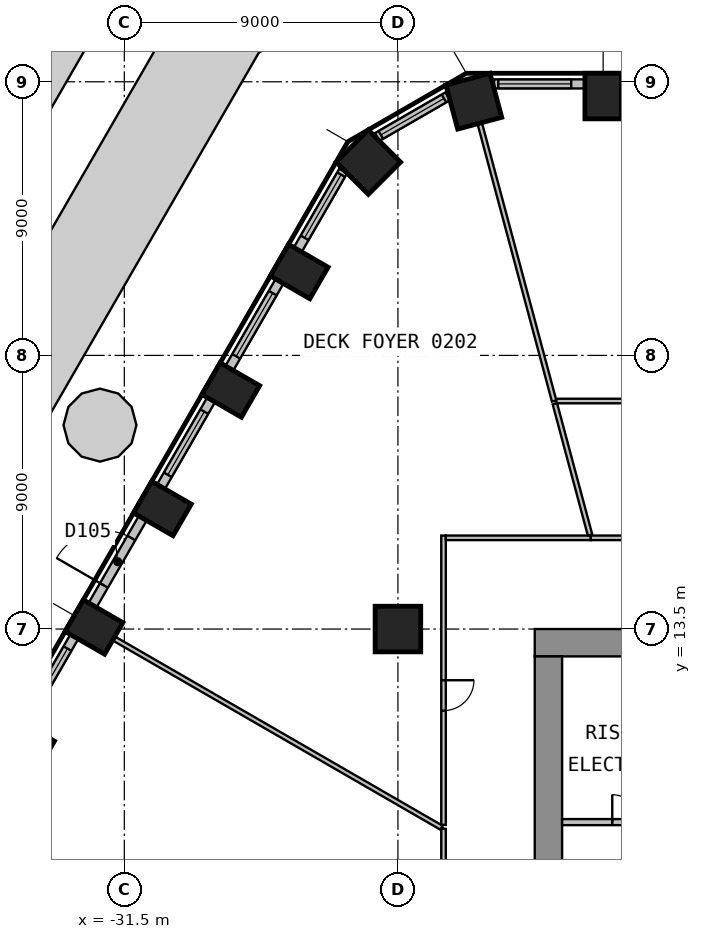
"""IFC4 building model, lengths in metres.
Left out: names, types, materials, properties, quantities, classifications, styles, units other than length and angle.
Written with IfcOpenShell. Run it as: python <this file> out.ifc"""

import sys

from ifc_helpers import new_model, si_unit, direction, frame, frame_2d, origin, origin_2d, place, context, subcontext, project, spatial, polyline, rectangle, circle, outline, extrude, element, fill, save


model = new_model("IFC4")
c1 = context("Model", 3, precision=1e-05, world=origin(), true_north=direction((0.0, 1.0)))
c2 = subcontext(c1, "Body", "Model", "MODEL_VIEW")
j1 = project(units=[si_unit("LENGTHUNIT", "METRE"), si_unit("PLANEANGLEUNIT", "RADIAN")], contexts=[c1])
p1 = place(None, origin())
s1 = spatial("IfcSite", under=j1, at=p1, CompositionType="ELEMENT")
p2 = place(p1, origin())
s2 = spatial("IfcBuilding", under=s1, at=p2, CompositionType="ELEMENT")
p3 = place(p2, frame((0.0, 0.0, 10.8)))
s3 = spatial("IfcBuildingStorey", under=s2, at=p3, CompositionType="ELEMENT", Elevation=10.8)
p4 = place(p3, frame((-15.75, 31.03, 0.0), z_axis=(0.0, 0.0, 1.0), x_axis=(-1.0, 0.0, 0.0)))
e1 = element("IfcColumn", 1, at=p4, inside=s3, PredefinedType="COLUMN", context=c2, shape_type="SweptSolid", body=[
    extrude(rectangle(XDim=1.2, YDim=1.5, at=origin_2d()), origin(), (0.0, 0.0, 1.0), 4.4),
])
for number, where, z_axis, x_axis in (
    (2, (-20.004, 30.861, 0.0), (0.0, 0.0, 1.0), (-0.966, -0.259, 0.0)),
    (3, (-23.475, 28.857, 0.0), (0.0, 0.0, 1.0), (-0.707, -0.707, 0.0)),
):
    element("IfcColumn", number, at=place(p3, frame(where, z_axis=z_axis, x_axis=x_axis)), inside=s3, PredefinedType="COLUMN", context=c2, shape_type="SweptSolid", body=[
        extrude(rectangle(XDim=1.5, YDim=1.5, at=origin_2d()), origin(), (0.0, 0.0, 1.0), 4.4),
    ])
for number, where, z_axis, x_axis in (
    (4, (-25.748, 25.258, 0.0), (0.0, 0.0, 1.0), (-0.5, -0.866, 0.0)),
    (5, (-27.998, 21.361, 0.0), (0.0, 0.0, 1.0), (-0.5, -0.866, 0.0)),
    (6, (-30.248, 17.463, 0.0), (0.0, 0.0, 1.0), (-0.5, -0.866, 0.0)),
    (7, (-32.498, 13.566, 0.0), (0.0, 0.0, 1.0), (-0.5, -0.866, 0.0)),
    (8, (-34.748, 9.669, 0.0), (0.0, 0.0, 1.0), (-0.5, -0.866, 0.0)),
):
    element("IfcColumn", number, at=place(p3, frame(where, z_axis=z_axis, x_axis=x_axis)), inside=s3, PredefinedType="COLUMN", context=c2, shape_type="SweptSolid", body=[
        extrude(rectangle(XDim=1.2, YDim=1.5, at=origin_2d()), origin(), (0.0, 0.0, 1.0), 4.4),
    ])
p5 = place(p3, frame((-22.5, 13.5, 0.0), z_axis=(0.0, 0.0, 1.0), x_axis=(1.0, 0.0, 0.0)))
e9 = element("IfcColumn", 9, at=p5, inside=s3, PredefinedType="COLUMN", context=c2, shape_type="SweptSolid", body=[
    extrude(circle(Radius=0.75, at=origin_2d()), origin(), (0.0, 0.0, 1.0), 4.4),
])
p6 = place(p3, frame((-16.351, 31.43, 0.0), z_axis=(0.0, 0.0, 1.0), x_axis=(-1.0, 0.0, 0.0)))
e10 = element("IfcWall", 10, at=p6, inside=s3, PredefinedType="SOLIDWALL", context=c2, shape_type="SweptSolid", body=[
    extrude(rectangle(XDim=2.989, YDim=0.3, at=frame_2d((1.494, 0.0))), origin(), (0.0, 0.0, 1.0), 4.4),
])
p7 = place(p6, frame((0.449, 0.0, 0.9)))
e11 = element("IfcOpeningElement", 11, at=p7, cuts=e10, PredefinedType="OPENING", context=c2, shape_type="SweptSolid", body=[
    extrude(rectangle(XDim=2.4, YDim=3.0, at=frame_2d((1.2, 1.5))), frame((0.0, 0.16, 0.0), z_axis=(0.0, -1.0, 0.0), x_axis=(1.0, 0.0, 0.0)), (0.0, 0.0, 1.0), 0.32),
])
p8 = place(p3, frame((-20.864, 31.021, 0.0), z_axis=(0.0, 0.0, 1.0), x_axis=(-0.866001915448, -0.500040680786, 0.0)))
e12 = element("IfcWall", 12, at=p8, inside=s3, PredefinedType="SOLIDWALL", context=c2, shape_type="SweptSolid", body=[
    extrude(rectangle(XDim=2.678, YDim=0.3, at=frame_2d((1.339, 0.0))), origin(), (0.0, 0.0, 1.0), 4.4),
])
p9 = place(p8, frame((0.139, 0.0, 0.9)))
e13 = element("IfcOpeningElement", 13, at=p9, cuts=e12, PredefinedType="OPENING", context=c2, shape_type="SweptSolid", body=[
    extrude(rectangle(XDim=2.4, YDim=3.0, at=frame_2d((1.2, 1.5))), frame((0.0, 0.16, 0.0), z_axis=(0.0, -1.0, 0.0), x_axis=(1.0, 0.0, 0.0)), (0.0, 0.0, 1.0), 0.32),
])
p10 = place(p3, frame((-24.299, 28.566, 0.0), z_axis=(0.0, 0.0, 1.0), x_axis=(-0.49999586137, -0.866027793211, 0.0)))
e14 = element("IfcWall", 14, at=p10, inside=s3, PredefinedType="SOLIDWALL", context=c2, shape_type="SweptSolid", body=[
    extrude(rectangle(XDim=2.989, YDim=0.3, at=frame_2d((1.494, 0.0))), origin(), (0.0, 0.0, 1.0), 4.4),
])
p11 = place(p10, frame((0.139, 0.0, 0.9)))
e15 = element("IfcOpeningElement", 15, at=p11, cuts=e14, PredefinedType="OPENING", context=c2, shape_type="SweptSolid", body=[
    extrude(rectangle(XDim=2.4, YDim=3.0, at=frame_2d((1.2, 1.5))), frame((0.0, 0.16, 0.0), z_axis=(0.0, -1.0, 0.0), x_axis=(1.0, 0.0, 0.0)), (0.0, 0.0, 1.0), 0.32),
])
p12 = place(p3, frame((-26.394, 24.938, 0.0), z_axis=(0.0, 0.0, 1.0), x_axis=(-0.499991515992, -0.866030301974, 0.0)))
e16 = element("IfcWall", 16, at=p12, inside=s3, PredefinedType="SOLIDWALL", context=c2, shape_type="SweptSolid", body=[
    extrude(rectangle(XDim=3.299, YDim=0.3, at=frame_2d((1.649, 0.0))), origin(), (0.0, 0.0, 1.0), 4.4),
])
p13 = place(p12, frame((0.449, 0.0, 0.9)))
e17 = element("IfcOpeningElement", 17, at=p13, cuts=e16, PredefinedType="OPENING", context=c2, shape_type="SweptSolid", body=[
    extrude(rectangle(XDim=2.4, YDim=3.0, at=frame_2d((1.2, 1.5))), frame((0.0, 0.16, 0.0), z_axis=(0.0, -1.0, 0.0), x_axis=(1.0, 0.0, 0.0)), (0.0, 0.0, 1.0), 0.32),
])
p14 = place(p3, frame((-28.644, 21.041, 0.0), z_axis=(0.0, 0.0, 1.0), x_axis=(-0.499991515992, -0.866030301974, 0.0)))
e18 = element("IfcWall", 18, at=p14, inside=s3, PredefinedType="SOLIDWALL", context=c2, shape_type="SweptSolid", body=[
    extrude(rectangle(XDim=3.299, YDim=0.3, at=frame_2d((1.649, 0.0))), origin(), (0.0, 0.0, 1.0), 4.4),
])
p15 = place(p14, frame((0.449, 0.0, 0.9)))
e19 = element("IfcOpeningElement", 19, at=p15, cuts=e18, PredefinedType="OPENING", context=c2, shape_type="SweptSolid", body=[
    extrude(rectangle(XDim=2.4, YDim=3.0, at=frame_2d((1.2, 1.5))), frame((0.0, 0.16, 0.0), z_axis=(0.0, -1.0, 0.0), x_axis=(1.0, 0.0, 0.0)), (0.0, 0.0, 1.0), 0.32),
])
p16 = place(p3, frame((-32.544, 14.286, 0.0), z_axis=(0.0, 0.0, 1.0), x_axis=(0.499991515992, 0.866030301974, 0.0)))
e20 = element("IfcWall", 20, at=p16, inside=s3, PredefinedType="SOLIDWALL", context=c2, shape_type="SweptSolid", body=[
    extrude(rectangle(XDim=3.299, YDim=0.3, at=frame_2d((1.649, 0.0))), origin(), (0.0, 0.0, 1.0), 4.4),
])
p17 = place(p16, frame((0.75, 0.0, 0.0)))
e21 = element("IfcOpeningElement", 21, at=p17, cuts=e20, PredefinedType="OPENING", context=c2, shape_type="SweptSolid", body=[
    extrude(rectangle(XDim=1.8, YDim=2.4, at=frame_2d((0.9, 1.2))), frame((0.0, 0.16, 0.0), z_axis=(0.0, -1.0, 0.0), x_axis=(1.0, 0.0, 0.0)), (0.0, 0.0, 1.0), 0.32),
])
p18 = place(p3, frame((-33.144, 13.246, 0.0), z_axis=(0.0, 0.0, 1.0), x_axis=(-0.499991515992, -0.866030301974, 0.0)))
e22 = element("IfcWall", 22, at=p18, inside=s3, PredefinedType="SOLIDWALL", context=c2, shape_type="SweptSolid", body=[
    extrude(rectangle(XDim=3.299, YDim=0.3, at=frame_2d((1.649, 0.0))), origin(), (0.0, 0.0, 1.0), 4.4),
])
p19 = place(p18, frame((0.449, 0.0, 0.9)))
e23 = element("IfcOpeningElement", 23, at=p19, cuts=e22, PredefinedType="OPENING", context=c2, shape_type="SweptSolid", body=[
    extrude(rectangle(XDim=2.4, YDim=3.0, at=frame_2d((1.2, 1.5))), frame((0.0, 0.16, 0.0), z_axis=(0.0, -1.0, 0.0), x_axis=(1.0, 0.0, 0.0)), (0.0, 0.0, 1.0), 0.32),
])
p20 = place(p3, origin())
e24 = element("IfcWall", 24, at=p20, inside=s3, PredefinedType="SOLIDWALL", context=c2, shape_type="SweptSolid", body=[
    extrude(outline(polyline([(-37.484, 20.429), (-34.886, 18.929), (-27.075, 32.458), (-21.322, 35.78), (-1.2, 35.78), (-1.2, 38.78), (-22.125, 38.78), (-29.271, 34.654), (-37.484, 20.429)])), origin(), (0.0, 0.0, 1.0), 0.9),
])
p21 = place(p3, origin())
e25 = element("IfcWall", 25, at=p21, inside=s3, PredefinedType="SOLIDWALL", context=c2, shape_type="SweptSolid", body=[
    extrude(outline(polyline([(-42.68, 23.429), (-39.216, 21.429), (-30.736, 36.118), (-22.662, 40.78), (-1.2, 40.78), (-1.2, 44.78), (-23.733, 44.78), (-33.664, 39.046), (-42.68, 23.429)])), origin(), (0.0, 0.0, 1.0), 0.9),
])
p22 = place(p3, origin())
e26 = element("IfcWall", 26, at=p22, inside=s3, PredefinedType="SOLIDWALL", context=c2, shape_type="SweptSolid", body=[
    extrude(outline(polyline([(-31.101, 20.208), (-31.261, 19.608), (-31.701, 19.168), (-32.301, 19.008), (-32.901, 19.168), (-33.34, 19.608), (-33.5, 20.208), (-33.34, 20.808), (-32.901, 21.247), (-32.301, 21.408), (-31.701, 21.247), (-31.261, 20.808), (-31.101, 20.208)])), origin(), (0.0, 0.0, 1.0), 0.6),
])
p23 = place(p3, frame((-18.0, 13.05, 0.0), z_axis=(0.0, 0.0, 1.0), x_axis=(1.0, 0.0, 0.0)))
e27 = element("IfcWall", 27, at=p23, inside=s3, PredefinedType="SHEAR", context=c2, shape_type="SweptSolid", body=[
    extrude(rectangle(XDim=36.0, YDim=0.9, at=frame_2d((18.0, 0.0))), origin(), (0.0, 0.0, 1.0), 4.4),
])
p24 = place(p23, frame((16.8, 0.0, 0.0)))
e28 = element("IfcOpeningElement", 28, at=p24, cuts=e27, PredefinedType="OPENING", context=c2, shape_type="SweptSolid", body=[
    extrude(rectangle(XDim=2.4, YDim=2.1, at=frame_2d((1.2, 1.05))), frame((0.0, 0.46, 0.0), z_axis=(0.0, -1.0, 0.0), x_axis=(1.0, 0.0, 0.0)), (0.0, 0.0, 1.0), 0.92),
])
p25 = place(p23, frame((5.55, 0.0, 0.0)))
e29 = element("IfcOpeningElement", 29, at=p25, cuts=e27, PredefinedType="OPENING", context=c2, shape_type="SweptSolid", body=[
    extrude(rectangle(XDim=1.2, YDim=2.1, at=frame_2d((0.6, 1.05))), frame((0.0, 0.46, 0.0), z_axis=(0.0, -1.0, 0.0), x_axis=(1.0, 0.0, 0.0)), (0.0, 0.0, 1.0), 0.92),
])
p26 = place(p23, frame((29.25, 0.0, 0.0)))
e30 = element("IfcOpeningElement", 30, at=p26, cuts=e27, PredefinedType="OPENING", context=c2, shape_type="SweptSolid", body=[
    extrude(rectangle(XDim=1.2, YDim=2.1, at=frame_2d((0.6, 1.05))), frame((0.0, 0.46, 0.0), z_axis=(0.0, -1.0, 0.0), x_axis=(1.0, 0.0, 0.0)), (0.0, 0.0, 1.0), 0.92),
])
p27 = place(p3, frame((-17.55, -12.6, 0.0), z_axis=(0.0, 0.0, 1.0), x_axis=(0.0, 1.0, 0.0)))
e31 = element("IfcWall", 31, at=p27, inside=s3, PredefinedType="SHEAR", context=c2, shape_type="SweptSolid", body=[
    extrude(rectangle(XDim=25.2, YDim=0.9, at=frame_2d((12.6, 0.0))), origin(), (0.0, 0.0, 1.0), 4.4),
])
p28 = place(p27, frame((11.4, 0.0, 0.0)))
e32 = element("IfcOpeningElement", 32, at=p28, cuts=e31, PredefinedType="OPENING", context=c2, shape_type="SweptSolid", body=[
    extrude(rectangle(XDim=2.4, YDim=2.1, at=frame_2d((1.2, 1.05))), frame((0.0, 0.46, 0.0), z_axis=(0.0, -1.0, 0.0), x_axis=(1.0, 0.0, 0.0)), (0.0, 0.0, 1.0), 0.92),
])
p29 = place(p3, frame((-17.1, 7.15, 0.0), z_axis=(0.0, 0.0, 1.0), x_axis=(1.0, 0.0, 0.0)))
e33 = element("IfcWall", 33, at=p29, inside=s3, PredefinedType="PARTITIONING", context=c2, shape_type="SweptSolid", body=[
    extrude(rectangle(XDim=4.2, YDim=0.2, at=frame_2d((2.1, 0.0))), origin(), (0.0, 0.0, 1.0), 4.4),
])
p30 = place(p29, frame((1.65, 0.0, 0.0)))
e34 = element("IfcOpeningElement", 34, at=p30, cuts=e33, PredefinedType="OPENING", context=c2, shape_type="SweptSolid", body=[
    extrude(rectangle(XDim=0.9, YDim=2.1, at=frame_2d((0.45, 1.05))), frame((0.0, 0.11, 0.0), z_axis=(0.0, -1.0, 0.0), x_axis=(1.0, 0.0, 0.0)), (0.0, 0.0, 1.0), 0.22),
])
p31 = place(p3, frame((-31.831, 13.181, 0.0), z_axis=(0.0, 0.0, 1.0), x_axis=(0.866028931402, -0.499993889937, 0.0)))
e35 = element("IfcWall", 35, at=p31, inside=s3, PredefinedType="PARTITIONING", context=c2, shape_type="SweptSolid", body=[
    extrude(rectangle(XDim=12.431, YDim=0.15, at=frame_2d((6.216, 0.0))), origin(), (0.0, 0.0, 1.0), 4.4),
])
p32 = place(p3, frame((-21.0, 6.928, 0.0), z_axis=(0.0, 0.0, 1.0), x_axis=(0.0, -1.0, 0.0)))
e36 = element("IfcWall", 36, at=p32, inside=s3, PredefinedType="PARTITIONING", context=c2, shape_type="SweptSolid", body=[
    extrude(rectangle(XDim=9.741, YDim=0.15, at=frame_2d((4.871, 0.0))), origin(), (0.0, 0.0, 1.0), 4.4),
])
p33 = place(p32, frame((4.371, 0.0, 0.0)))
e37 = element("IfcOpeningElement", 37, at=p33, cuts=e36, PredefinedType="OPENING", context=c2, shape_type="SweptSolid", body=[
    extrude(rectangle(XDim=1.0, YDim=2.1, at=frame_2d((0.5, 1.05))), frame((0.0, 0.085, 0.0), z_axis=(0.0, -1.0, 0.0), x_axis=(1.0, 0.0, 0.0)), (0.0, 0.0, 1.0), 0.17),
])
p34 = place(p3, frame((-21.0, 16.575, 0.0), z_axis=(0.0, 0.0, 1.0), x_axis=(0.0, -1.0, 0.0)))
e38 = element("IfcWall", 38, at=p34, inside=s3, PredefinedType="PARTITIONING", context=c2, shape_type="SweptSolid", body=[
    extrude(rectangle(XDim=9.517, YDim=0.15, at=frame_2d((4.758, 0.0))), origin(), (0.0, 0.0, 1.0), 4.4),
])
p35 = place(p34, frame((4.759, 0.0, 0.0)))
e39 = element("IfcOpeningElement", 39, at=p35, cuts=e38, PredefinedType="OPENING", context=c2, shape_type="SweptSolid", body=[
    extrude(rectangle(XDim=1.0, YDim=2.1, at=frame_2d((0.5, 1.05))), frame((0.0, 0.085, 0.0), z_axis=(0.0, -1.0, 0.0), x_axis=(1.0, 0.0, 0.0)), (0.0, 0.0, 1.0), 0.17),
])
p36 = place(p3, frame((-16.156, 16.5, 0.0), z_axis=(0.0, 0.0, 1.0), x_axis=(-1.0, 0.0, 0.0)))
e40 = element("IfcWall", 40, at=p36, inside=s3, PredefinedType="PARTITIONING", context=c2, shape_type="SweptSolid", body=[
    extrude(rectangle(XDim=4.769, YDim=0.15, at=frame_2d((2.385, 0.0))), origin(), (0.0, 0.0, 1.0), 4.4),
])
p37 = place(p3, frame((-19.805, 30.117, 0.0), z_axis=(0.0, 0.0, 1.0), x_axis=(0.258805468398, -0.965929464054, 0.0)))
e41 = element("IfcWall", 41, at=p37, inside=s3, PredefinedType="PARTITIONING", context=c2, shape_type="SweptSolid", body=[
    extrude(rectangle(XDim=9.439, YDim=0.15, at=frame_2d((4.719, 0.0))), origin(), (0.0, 0.0, 1.0), 4.4),
])
p38 = place(p3, frame((-17.337, 20.908, 0.0), z_axis=(0.0, 0.0, 1.0), x_axis=(0.258852599715, -0.965916834733, 0.0)))
e42 = element("IfcWall", 42, at=p38, inside=s3, PredefinedType="PARTITIONING", context=c2, shape_type="SweptSolid", body=[
    extrude(rectangle(XDim=4.469, YDim=0.15, at=frame_2d((2.234, 0.0))), origin(), (0.0, 0.0, 1.0), 4.4),
])
p39 = place(p3, frame((-2.325, 21.0, 0.0), z_axis=(0.0, 0.0, 1.0), x_axis=(-1.0, 0.0, 0.0)))
e43 = element("IfcWall", 43, at=p39, inside=s3, PredefinedType="PARTITIONING", context=c2, shape_type="SweptSolid", body=[
    extrude(rectangle(XDim=14.962, YDim=0.15, at=frame_2d((7.481, 0.0))), origin(), (0.0, 0.0, 1.0), 4.4),
])
p40 = place(p3, frame((-2.175, 16.5, 0.0), z_axis=(0.0, 0.0, 1.0), x_axis=(-1.0, 0.0, 0.0)))
e44 = element("IfcWall", 44, at=p40, inside=s3, PredefinedType="PARTITIONING", context=c2, shape_type="SweptSolid", body=[
    extrude(rectangle(XDim=13.981, YDim=0.15, at=frame_2d((6.99, 0.0))), origin(), (0.0, 0.0, 1.0), 4.4),
])
p41 = place(p40, frame((6.49, 0.0, 0.0)))
e45 = element("IfcOpeningElement", 45, at=p41, cuts=e44, PredefinedType="OPENING", context=c2, shape_type="SweptSolid", body=[
    extrude(rectangle(XDim=1.0, YDim=2.1, at=frame_2d((0.5, 1.05))), frame((0.0, 0.085, 0.0), z_axis=(0.0, -1.0, 0.0), x_axis=(1.0, 0.0, 0.0)), (0.0, 0.0, 1.0), 0.17),
])
p42 = place(p7, origin())
e46 = element("IfcWindow", 46, at=p42, inside=s3, PartitioningType="SINGLE_PANEL", PredefinedType="WINDOW", context=c2, shape_type="SweptSolid", body=[
    extrude(rectangle(XDim=2.4, YDim=3.0, at=frame_2d((1.2, 1.5))), frame((0.0, 0.03, 0.0), z_axis=(0.0, -1.0, 0.0), x_axis=(1.0, 0.0, 0.0)), (0.0, 0.0, 1.0), 0.06),
])
fill(e11, e46)
p43 = place(p9, origin())
e47 = element("IfcWindow", 47, at=p43, inside=s3, PartitioningType="SINGLE_PANEL", PredefinedType="WINDOW", context=c2, shape_type="SweptSolid", body=[
    extrude(rectangle(XDim=2.4, YDim=3.0, at=frame_2d((1.2, 1.5))), frame((0.0, 0.03, 0.0), z_axis=(0.0, -1.0, 0.0), x_axis=(1.0, 0.0, 0.0)), (0.0, 0.0, 1.0), 0.06),
])
fill(e13, e47)
p44 = place(p11, origin())
e48 = element("IfcWindow", 48, at=p44, inside=s3, PartitioningType="SINGLE_PANEL", PredefinedType="WINDOW", context=c2, shape_type="SweptSolid", body=[
    extrude(rectangle(XDim=2.4, YDim=3.0, at=frame_2d((1.2, 1.5))), frame((0.0, 0.03, 0.0), z_axis=(0.0, -1.0, 0.0), x_axis=(1.0, 0.0, 0.0)), (0.0, 0.0, 1.0), 0.06),
])
fill(e15, e48)
p45 = place(p13, origin())
e49 = element("IfcWindow", 49, at=p45, inside=s3, PartitioningType="SINGLE_PANEL", PredefinedType="WINDOW", context=c2, shape_type="SweptSolid", body=[
    extrude(rectangle(XDim=2.4, YDim=3.0, at=frame_2d((1.2, 1.5))), frame((0.0, 0.03, 0.0), z_axis=(0.0, -1.0, 0.0), x_axis=(1.0, 0.0, 0.0)), (0.0, 0.0, 1.0), 0.06),
])
fill(e17, e49)
p46 = place(p15, origin())
e50 = element("IfcWindow", 50, at=p46, inside=s3, PartitioningType="SINGLE_PANEL", PredefinedType="WINDOW", context=c2, shape_type="SweptSolid", body=[
    extrude(rectangle(XDim=2.4, YDim=3.0, at=frame_2d((1.2, 1.5))), frame((0.0, 0.03, 0.0), z_axis=(0.0, -1.0, 0.0), x_axis=(1.0, 0.0, 0.0)), (0.0, 0.0, 1.0), 0.06),
])
fill(e19, e50)
p47 = place(p17, origin())
e51 = element("IfcDoor", 51, at=p47, inside=s3, OperationType="DOUBLE_DOOR_SINGLE_SWING", PredefinedType="DOOR", context=c2, shape_type="SweptSolid", body=[
    extrude(rectangle(XDim=1.8, YDim=2.4, at=frame_2d((0.9, 1.2))), frame((0.0, 0.025, 0.0), z_axis=(0.0, -1.0, 0.0), x_axis=(1.0, 0.0, 0.0)), (0.0, 0.0, 1.0), 0.05),
])
fill(e21, e51)
p48 = place(p19, origin())
e52 = element("IfcWindow", 52, at=p48, inside=s3, PartitioningType="SINGLE_PANEL", PredefinedType="WINDOW", context=c2, shape_type="SweptSolid", body=[
    extrude(rectangle(XDim=2.4, YDim=3.0, at=frame_2d((1.2, 1.5))), frame((0.0, 0.03, 0.0), z_axis=(0.0, -1.0, 0.0), x_axis=(1.0, 0.0, 0.0)), (0.0, 0.0, 1.0), 0.06),
])
fill(e23, e52)
p49 = place(p30, origin())
e53 = element("IfcDoor", 53, at=p49, inside=s3, OperationType="SINGLE_SWING_LEFT", PredefinedType="DOOR", context=c2, shape_type="SweptSolid", body=[
    extrude(rectangle(XDim=0.9, YDim=2.1, at=frame_2d((0.45, 1.05))), frame((0.0, 0.025, 0.0), z_axis=(0.0, -1.0, 0.0), x_axis=(1.0, 0.0, 0.0)), (0.0, 0.0, 1.0), 0.05),
])
fill(e34, e53)
p50 = place(p35, origin())
e54 = element("IfcDoor", 54, at=p50, inside=s3, OperationType="SINGLE_SWING_RIGHT", PredefinedType="DOOR", context=c2, shape_type="SweptSolid", body=[
    extrude(rectangle(XDim=1.0, YDim=2.1, at=frame_2d((0.5, 1.05))), frame((0.0, 0.025, 0.0), z_axis=(0.0, -1.0, 0.0), x_axis=(1.0, 0.0, 0.0)), (0.0, 0.0, 1.0), 0.05),
])
fill(e39, e54)
save(model, sys.argv[1])
